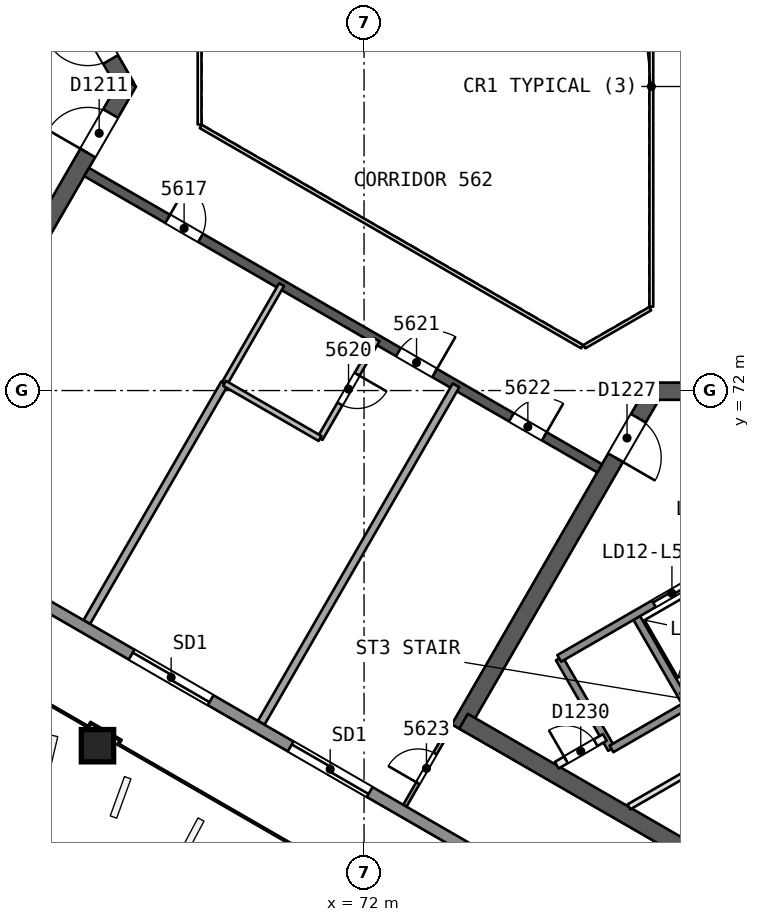
"""IFC4 building model, lengths in metres.
Left out: names, types, materials, properties, quantities, classifications, styles, units other than length and angle.
Written with IfcOpenShell. Run it as: python <this file> out.ifc"""

import sys

from ifc_helpers import new_model, si_unit, direction, frame, frame_2d, origin, origin_2d, place, context, subcontext, project, spatial, rectangle, extrude, element, fill, save


model = new_model("IFC4")
c1 = context("Model", 3, precision=1e-05, world=origin(), true_north=direction((0.0, 1.0)))
c2 = subcontext(c1, "Body", "Model", "MODEL_VIEW")
j1 = project(units=[si_unit("LENGTHUNIT", "METRE"), si_unit("PLANEANGLEUNIT", "RADIAN")], contexts=[c1])
p1 = place(None, origin())
s1 = spatial("IfcSite", under=j1, at=p1, CompositionType="ELEMENT")
p2 = place(p1, origin())
s2 = spatial("IfcBuilding", under=s1, at=p2, CompositionType="ELEMENT")
p3 = place(p2, frame((0.0, 0.0, 228.0)))
s3 = spatial("IfcBuildingStorey", under=s2, at=p3, CompositionType="ELEMENT", Elevation=228.0)
p4 = place(p3, frame((65.74, 80.0, 0.0), z_axis=(0.0, 0.0, 1.0), x_axis=(-0.499991857942, 0.866030104553, 0.0)))
e1 = element("IfcWall", 1, at=p4, inside=s3, PredefinedType="SHEAR", context=c2, shape_type="SweptSolid", body=[
    extrude(rectangle(XDim=10.25, YDim=0.45, at=frame_2d((5.125, 0.0))), origin(), (0.0, 0.0, 1.0), 3.7),
])
p5 = place(p4, frame((0.82, 0.0, 0.0)))
e2 = element("IfcOpeningElement", 2, at=p5, cuts=e1, PredefinedType="OPENING", context=c2, shape_type="SweptSolid", body=[
    extrude(rectangle(XDim=1.2, YDim=2.1, at=frame_2d((0.6, 1.05))), frame((0.0, 0.235, 0.0), z_axis=(0.0, -1.0, 0.0), x_axis=(1.0, 0.0, 0.0)), (0.0, 0.0, 1.0), 0.471),
])
p6 = place(p3, frame((60.728, 71.318, 0.0), z_axis=(0.0, 0.0, 1.0), x_axis=(0.500012416173, 0.866018235185, 0.0)))
e3 = element("IfcWall", 3, at=p6, inside=s3, PredefinedType="SHEAR", context=c2, shape_type="SweptSolid", body=[
    extrude(rectangle(XDim=10.155, YDim=0.45, at=frame_2d((5.078, 0.0))), origin(), (0.0, 0.0, 1.0), 3.7),
])
p7 = place(p6, frame((8.005, 0.0, 0.0)))
e4 = element("IfcOpeningElement", 4, at=p7, cuts=e3, PredefinedType="OPENING", context=c2, shape_type="SweptSolid", body=[
    extrude(rectangle(XDim=1.2, YDim=2.1, at=frame_2d((0.6, 1.05))), frame((0.0, 0.235, 0.0), z_axis=(0.0, -1.0, 0.0), x_axis=(1.0, 0.0, 0.0)), (0.0, 0.0, 1.0), 0.471),
])
p8 = place(p3, frame((79.63, 71.981, 0.0), z_axis=(0.0, 0.0, 1.0), x_axis=(-0.500002171595, -0.86602415001, 0.0)))
e5 = element("IfcWall", 5, at=p8, inside=s3, PredefinedType="SHEAR", context=c2, shape_type="SweptSolid", body=[
    extrude(rectangle(XDim=10.25, YDim=0.45, at=frame_2d((5.125, 0.0))), origin(), (0.0, 0.0, 1.0), 3.7),
])
p9 = place(p8, frame((0.82, 0.0, 0.0)))
e6 = element("IfcOpeningElement", 6, at=p9, cuts=e5, PredefinedType="OPENING", context=c2, shape_type="SweptSolid", body=[
    extrude(rectangle(XDim=1.2, YDim=2.1, at=frame_2d((0.6, 1.05))), frame((0.0, 0.235, 0.0), z_axis=(0.0, -1.0, 0.0), x_axis=(1.0, 0.0, 0.0)), (0.0, 0.0, 1.0), 0.471),
])
p10 = place(p3, frame((74.617, 63.299, 0.0), z_axis=(0.0, 0.0, 1.0), x_axis=(0.86602594008, -0.499999071108, 0.0)))
e7 = element("IfcWall", 7, at=p10, inside=s3, PredefinedType="SHEAR", context=c2, shape_type="SweptSolid", body=[
    extrude(rectangle(XDim=14.108, YDim=0.45, at=frame_2d((7.054, 0.0))), origin(), (0.0, 0.0, 1.0), 3.7),
])
p11 = place(p3, frame((89.655, 71.981, 0.0), z_axis=(0.0, 0.0, 1.0), x_axis=(-1.0, 0.0, 0.0)))
e8 = element("IfcWall", 8, at=p11, inside=s3, PredefinedType="SHEAR", context=c2, shape_type="SweptSolid", body=[
    extrude(rectangle(XDim=10.155, YDim=0.45, at=frame_2d((5.078, 0.0))), origin(), (0.0, 0.0, 1.0), 3.7),
])
p12 = place(p11, frame((8.005, 0.0, 0.0)))
e9 = element("IfcOpeningElement", 9, at=p12, cuts=e8, PredefinedType="OPENING", context=c2, shape_type="SweptSolid", body=[
    extrude(rectangle(XDim=1.2, YDim=2.1, at=frame_2d((0.6, 1.05))), frame((0.0, 0.235, 0.0), z_axis=(0.0, -1.0, 0.0), x_axis=(1.0, 0.0, 0.0)), (0.0, 0.0, 1.0), 0.471),
])
p13 = place(p3, frame((64.7, 77.748, 0.0), z_axis=(0.0, 0.0, 1.0), x_axis=(0.866026492143, -0.499998114903, 0.0)))
e10 = element("IfcWall", 10, at=p13, inside=s3, PredefinedType="SHEAR", context=c2, shape_type="SweptSolid", body=[
    extrude(rectangle(XDim=15.588, YDim=0.25, at=frame_2d((7.794, 0.0))), origin(), (0.0, 0.0, 1.0), 3.3),
])
p14 = place(p13, frame((2.462, 0.0, 0.0)))
e11 = element("IfcOpeningElement", 11, at=p14, cuts=e10, PredefinedType="OPENING", context=c2, shape_type="SweptSolid", body=[
    extrude(rectangle(XDim=1.0, YDim=2.1, at=frame_2d((0.5, 1.05))), frame((0.0, 0.135, 0.0), z_axis=(0.0, -1.0, 0.0), x_axis=(1.0, 0.0, 0.0)), (0.0, 0.0, 1.0), 0.271),
])
p15 = place(p13, frame((9.474, 0.0, 0.0)))
e12 = element("IfcOpeningElement", 12, at=p15, cuts=e10, PredefinedType="OPENING", context=c2, shape_type="SweptSolid", body=[
    extrude(rectangle(XDim=1.1, YDim=2.1, at=frame_2d((0.55, 1.05))), frame((0.0, 0.135, 0.0), z_axis=(0.0, -1.0, 0.0), x_axis=(1.0, 0.0, 0.0)), (0.0, 0.0, 1.0), 0.271),
])
p16 = place(p13, frame((12.906, 0.0, 0.0)))
e13 = element("IfcOpeningElement", 13, at=p16, cuts=e10, PredefinedType="OPENING", context=c2, shape_type="SweptSolid", body=[
    extrude(rectangle(XDim=1.0, YDim=2.1, at=frame_2d((0.5, 1.05))), frame((0.0, 0.135, 0.0), z_axis=(0.0, -1.0, 0.0), x_axis=(1.0, 0.0, 0.0)), (0.0, 0.0, 1.0), 0.271),
])
p17 = place(p3, frame((64.974, 62.634, 0.0), z_axis=(0.010093620709, 0.017482414954, 0.999796221231), x_axis=(-0.866029335546, 0.499993189927, 2.83273e-07)))
e14 = element("IfcColumn", 14, at=p17, inside=s3, PredefinedType="COLUMN", context=c2, shape_type="SweptSolid", body=[
    extrude(rectangle(XDim=0.85, YDim=0.85, at=origin_2d()), origin(), (0.0, 0.0, 1.0), 3.701),
])
p18 = place(p3, frame((64.703, 65.907, 0.0), z_axis=(0.0, 0.0, 1.0), x_axis=(0.500019628412, 0.866014071019, 0.0)))
e15 = element("IfcWall", 15, at=p18, inside=s3, PredefinedType="PARTITIONING", context=c2, shape_type="SweptSolid", body=[
    extrude(rectangle(XDim=7.254, YDim=0.2, at=frame_2d((3.627, 0.0))), origin(), (0.0, 0.0, 1.0), 3.3),
])
p19 = place(p3, frame((68.33, 72.188, 0.0), z_axis=(0.0, 0.0, 1.0), x_axis=(0.499990139034, 0.866031096941, 0.0)))
e16 = element("IfcWall", 16, at=p19, inside=s3, PredefinedType="PARTITIONING", context=c2, shape_type="SweptSolid", body=[
    extrude(rectangle(XDim=3.0, YDim=0.15, at=frame_2d((1.5, 0.0))), origin(), (0.0, 0.0, 1.0), 3.3),
])
p20 = place(p3, frame((72.342, 73.336, 0.0), z_axis=(0.0, 0.0, 1.0), x_axis=(-0.50002537861, -0.866010750942, 0.0)))
e17 = element("IfcWall", 17, at=p20, inside=s3, PredefinedType="PARTITIONING", context=c2, shape_type="SweptSolid", body=[
    extrude(rectangle(XDim=3.0, YDim=0.15, at=frame_2d((1.5, 0.0))), origin(), (0.0, 0.0, 1.0), 3.3),
])
p21 = place(p20, frame((1.05, 0.0, 0.0)))
e18 = element("IfcOpeningElement", 18, at=p21, cuts=e17, PredefinedType="OPENING", context=c2, shape_type="SweptSolid", body=[
    extrude(rectangle(XDim=0.9, YDim=2.1, at=frame_2d((0.45, 1.05))), frame((0.0, 0.085, 0.0), z_axis=(0.0, -1.0, 0.0), x_axis=(1.0, 0.0, 0.0)), (0.0, 0.0, 1.0), 0.171),
])
p22 = place(p3, frame((70.842, 70.739, 0.0), z_axis=(0.0, 0.0, 1.0), x_axis=(-0.866032775405, 0.499987231761, 0.0)))
e19 = element("IfcWall", 19, at=p22, inside=s3, PredefinedType="PARTITIONING", context=c2, shape_type="SweptSolid", body=[
    extrude(rectangle(XDim=2.9, YDim=0.15, at=frame_2d((1.45, 0.0))), origin(), (0.0, 0.0, 1.0), 3.3),
])
p23 = place(p3, frame((69.293, 63.257, 0.0), z_axis=(0.0, 0.0, 1.0), x_axis=(0.49999314277, 0.866029362772, 0.0)))
e20 = element("IfcWall", 20, at=p23, inside=s3, PredefinedType="PARTITIONING", context=c2, shape_type="SweptSolid", body=[
    extrude(rectangle(XDim=10.254, YDim=0.2, at=frame_2d((5.127, 0.0))), origin(), (0.0, 0.0, 1.0), 3.3),
])
p24 = place(p3, frame((73.073, 61.074, 0.0), z_axis=(0.0, 0.0, 1.0), x_axis=(0.499948534732, 0.866055115232, 0.0)))
e21 = element("IfcWall", 21, at=p24, inside=s3, PredefinedType="PARTITIONING", context=c2, shape_type="SweptSolid", body=[
    extrude(rectangle(XDim=2.275, YDim=0.1, at=frame_2d((1.137, 0.0))), origin(), (0.0, 0.0, 1.0), 3.3),
])
p25 = place(p24, frame((0.687, 0.0, 0.0)))
e22 = element("IfcOpeningElement", 22, at=p25, cuts=e21, PredefinedType="OPENING", context=c2, shape_type="SweptSolid", body=[
    extrude(rectangle(XDim=0.9, YDim=2.1, at=frame_2d((0.45, 1.05))), frame((0.0, 0.061, 0.0), z_axis=(0.0, -1.0, 0.0), x_axis=(1.0, 0.0, 0.0)), (0.0, 0.0, 1.0), 0.121),
])
p26 = place(p3, frame((88.043, 52.259, 0.0), z_axis=(0.0, 0.0, 1.0), x_axis=(-0.86602387423, 0.500002649256, 0.0)))
e23 = element("IfcWall", 23, at=p26, inside=s3, PredefinedType="SOLIDWALL", context=c2, shape_type="SweptSolid", body=[
    extrude(rectangle(XDim=50.333, YDim=0.3, at=frame_2d((25.167, 0.0))), origin(), (0.0, 0.0, 1.0), 3.3),
])
p27 = place(p26, frame((23.187, 0.0, 0.0)))
e24 = element("IfcOpeningElement", 24, at=p27, cuts=e23, PredefinedType="OPENING", context=c2, shape_type="SweptSolid", body=[
    extrude(rectangle(XDim=2.4, YDim=2.4, at=frame_2d((1.2, 1.2))), frame((0.0, 0.161, 0.0), z_axis=(0.0, -1.0, 0.0), x_axis=(1.0, 0.0, 0.0)), (0.0, 0.0, 1.0), 0.321),
])
p28 = place(p26, frame((28.799, 0.0, 0.0)))
e25 = element("IfcOpeningElement", 25, at=p28, cuts=e23, PredefinedType="OPENING", context=c2, shape_type="SweptSolid", body=[
    extrude(rectangle(XDim=2.4, YDim=2.4, at=frame_2d((1.2, 1.2))), frame((0.0, 0.161, 0.0), z_axis=(0.0, -1.0, 0.0), x_axis=(1.0, 0.0, 0.0)), (0.0, 0.0, 1.0), 0.321),
])
p29 = place(p26, frame((39.164, 0.0, 0.0)))
e26 = element("IfcOpeningElement", 26, at=p29, cuts=e23, PredefinedType="OPENING", context=c2, shape_type="SweptSolid", body=[
    extrude(rectangle(XDim=2.4, YDim=2.4, at=frame_2d((1.2, 1.2))), frame((0.0, 0.161, 0.0), z_axis=(0.0, -1.0, 0.0), x_axis=(1.0, 0.0, 0.0)), (0.0, 0.0, 1.0), 0.321),
])
p30 = place(p26, frame((18.354, 0.0, 0.0)))
e27 = element("IfcOpeningElement", 27, at=p30, cuts=e23, PredefinedType="OPENING", context=c2, shape_type="SweptSolid", body=[
    extrude(rectangle(XDim=2.4, YDim=2.4, at=frame_2d((1.2, 1.2))), frame((0.0, 0.161, 0.0), z_axis=(0.0, -1.0, 0.0), x_axis=(1.0, 0.0, 0.0)), (0.0, 0.0, 1.0), 0.321),
])
p31 = place(p26, frame((8.763, 0.0, 0.0)))
e28 = element("IfcOpeningElement", 28, at=p31, cuts=e23, PredefinedType="OPENING", context=c2, shape_type="SweptSolid", body=[
    extrude(rectangle(XDim=2.4, YDim=2.4, at=frame_2d((1.2, 1.2))), frame((0.0, 0.161, 0.0), z_axis=(0.0, -1.0, 0.0), x_axis=(1.0, 0.0, 0.0)), (0.0, 0.0, 1.0), 0.321),
])
for number, where, z_axis, x_axis in (
    (29, (77.135, 64.952, 0.0), (0.0, 0.0, 1.0), (0.5, -0.866, 0.0)),
    (30, (79.127, 66.102, 0.0), (0.0, 0.0, 1.0), (0.5, -0.866, 0.0)),
):
    element("IfcWall", number, at=place(p3, frame(where, z_axis=z_axis, x_axis=x_axis)), inside=s3, PredefinedType="SOLIDWALL", context=c2, shape_type="SweptSolid", body=[
        extrude(rectangle(XDim=2.75, YDim=0.2, at=frame_2d((1.375, 0.0))), origin(), (0.0, 0.0, 1.0), 3.3),
    ])
p32 = place(p3, frame((77.135, 64.952, 0.0), z_axis=(0.0, 0.0, 1.0), x_axis=(0.866031916153, 0.499988720078, 0.0)))
e31 = element("IfcWall", 31, at=p32, inside=s3, PredefinedType="SOLIDWALL", context=c2, shape_type="SweptSolid", body=[
    extrude(rectangle(XDim=11.35, YDim=0.2, at=frame_2d((5.675, 0.0))), origin(), (0.0, 0.0, 1.0), 3.3),
])
p33 = place(p32, frame((2.875, 0.0, 0.0)))
e32 = element("IfcOpeningElement", 32, at=p33, cuts=e31, PredefinedType="OPENING", context=c2, shape_type="SweptSolid", body=[
    extrude(rectangle(XDim=1.1, YDim=2.1, at=frame_2d((0.55, 1.05))), frame((0.0, 0.11, 0.0), z_axis=(0.0, -1.0, 0.0), x_axis=(1.0, 0.0, 0.0)), (0.0, 0.0, 1.0), 0.221),
])
p34 = place(p32, frame((5.125, 0.0, 0.0)))
e33 = element("IfcOpeningElement", 33, at=p34, cuts=e31, PredefinedType="OPENING", context=c2, shape_type="SweptSolid", body=[
    extrude(rectangle(XDim=1.1, YDim=2.1, at=frame_2d((0.55, 1.05))), frame((0.0, 0.11, 0.0), z_axis=(0.0, -1.0, 0.0), x_axis=(1.0, 0.0, 0.0)), (0.0, 0.0, 1.0), 0.221),
])
p35 = place(p32, frame((7.375, 0.0, 0.0)))
e34 = element("IfcOpeningElement", 34, at=p35, cuts=e31, PredefinedType="OPENING", context=c2, shape_type="SweptSolid", body=[
    extrude(rectangle(XDim=1.1, YDim=2.1, at=frame_2d((0.55, 1.05))), frame((0.0, 0.11, 0.0), z_axis=(0.0, -1.0, 0.0), x_axis=(1.0, 0.0, 0.0)), (0.0, 0.0, 1.0), 0.221),
])
p36 = place(p3, frame((77.07, 62.143, 0.0), z_axis=(0.0, 0.0, 1.0), x_axis=(0.866013036001, 0.500021421018, 0.0)))
e35 = element("IfcWall", 35, at=p36, inside=s3, PredefinedType="PARTITIONING", context=c2, shape_type="SweptSolid", body=[
    extrude(rectangle(XDim=1.461, YDim=0.2, at=frame_2d((0.73, 0.0))), origin(), (0.0, 0.0, 1.0), 3.3),
])
p37 = place(p36, frame((0.281, 0.0, 0.0)))
e36 = element("IfcOpeningElement", 36, at=p37, cuts=e35, PredefinedType="OPENING", context=c2, shape_type="SweptSolid", body=[
    extrude(rectangle(XDim=0.9, YDim=2.1, at=frame_2d((0.45, 1.05))), frame((0.0, 0.11, 0.0), z_axis=(0.0, -1.0, 0.0), x_axis=(1.0, 0.0, 0.0)), (0.0, 0.0, 1.0), 0.221),
])
p38 = place(p3, frame((80.367, 63.954, 0.0), z_axis=(0.0, 0.0, 1.0), x_axis=(0.866026575979, 0.499997969693, 0.0)))
e37 = element("IfcWall", 37, at=p38, inside=s3, PredefinedType="SOLIDWALL", context=c2, shape_type="SweptSolid", body=[
    extrude(rectangle(XDim=6.75, YDim=0.2, at=frame_2d((3.375, 0.0))), origin(), (0.0, 0.0, 1.0), 3.3),
])
p39 = place(p3, frame((78.51, 62.57, 0.0), z_axis=(0.0, 0.0, 1.0), x_axis=(0.866053019151, 0.499952165731, 0.0)))
e38 = element("IfcWall", 38, at=p39, inside=s3, PredefinedType="SOLIDWALL", context=c2, shape_type="SweptSolid", body=[
    extrude(rectangle(XDim=2.3, YDim=0.2, at=frame_2d((1.15, 0.0))), origin(), (0.0, 0.0, 1.0), 3.3),
])
p40 = place(p3, frame((78.97, 61.046, 0.0), z_axis=(0.0, 0.0, 1.0), x_axis=(0.866033475577, 0.499986018985, 0.0)))
e39 = element("IfcWall", 39, at=p40, inside=s3, PredefinedType="PARTITIONING", context=c2, shape_type="SweptSolid", body=[
    extrude(rectangle(XDim=2.539, YDim=0.15, at=frame_2d((1.27, 0.0))), origin(), (0.0, 0.0, 1.0), 3.3),
])
p41 = place(p3, frame((79.56, 74.206, 0.0), z_axis=(0.0, 0.0, 1.0), x_axis=(0.0, 1.0, 0.0)))
e40 = element("IfcWall", 40, at=p41, inside=s3, PredefinedType="PARTITIONING", context=c2, shape_type="SweptSolid", body=[
    extrude(rectangle(XDim=11.588, YDim=0.1, at=frame_2d((5.794, 0.0))), origin(), (0.0, 0.0, 1.0), 3.3),
])
p42 = place(p3, frame((67.672, 81.0, 0.0), z_axis=(0.0, 0.0, 1.0), x_axis=(0.0, -1.0, 0.0)))
e41 = element("IfcWall", 41, at=p42, inside=s3, PredefinedType="PARTITIONING", context=c2, shape_type="SweptSolid", body=[
    extrude(rectangle(XDim=2.0, YDim=0.1, at=frame_2d((1.0, 0.0))), origin(), (0.0, 0.0, 1.0), 3.3),
])
p43 = place(p3, frame((67.702, 78.948, 0.0), z_axis=(0.0, 0.0, 1.0), x_axis=(0.866026658274, -0.499997827154, 0.0)))
e42 = element("IfcWall", 42, at=p43, inside=s3, PredefinedType="PARTITIONING", context=c2, shape_type="SweptSolid", body=[
    extrude(rectangle(XDim=11.588, YDim=0.1, at=frame_2d((5.794, 0.0))), origin(), (0.0, 0.0, 1.0), 3.3),
])
p44 = place(p3, frame((77.798, 73.154, 0.0), z_axis=(0.0, 0.0, 1.0), x_axis=(0.866041268327, 0.499972520799, 0.0)))
e43 = element("IfcWall", 43, at=p44, inside=s3, PredefinedType="PARTITIONING", context=c2, shape_type="SweptSolid", body=[
    extrude(rectangle(XDim=2.0, YDim=0.1, at=frame_2d((1.0, 0.0))), origin(), (0.0, 0.0, 1.0), 3.3),
])
p45 = place(p14, origin())
e44 = element("IfcDoor", 44, at=p45, inside=s3, OperationType="SINGLE_SWING_LEFT", PredefinedType="NOTDEFINED", context=c2, shape_type="SweptSolid", body=[
    extrude(rectangle(XDim=1.0, YDim=2.1, at=frame_2d((0.5, 1.05))), frame((0.0, 0.025, 0.0), z_axis=(0.0, -1.0, 0.0), x_axis=(1.0, 0.0, 0.0)), (0.0, 0.0, 1.0), 0.05),
])
fill(e11, e44)
p46 = place(p21, origin())
e45 = element("IfcDoor", 45, at=p46, inside=s3, OperationType="SINGLE_SWING_LEFT", PredefinedType="NOTDEFINED", context=c2, shape_type="SweptSolid", body=[
    extrude(rectangle(XDim=0.9, YDim=2.1, at=frame_2d((0.45, 1.05))), frame((0.0, 0.025, 0.0), z_axis=(0.0, -1.0, 0.0), x_axis=(1.0, 0.0, 0.0)), (0.0, 0.0, 1.0), 0.05),
])
fill(e18, e45)
p47 = place(p15, origin())
e46 = element("IfcDoor", 46, at=p47, inside=s3, OperationType="SINGLE_SWING_RIGHT", PredefinedType="NOTDEFINED", context=c2, shape_type="SweptSolid", body=[
    extrude(rectangle(XDim=1.1, YDim=2.1, at=frame_2d((0.55, 1.05))), frame((0.0, 0.025, 0.0), z_axis=(0.0, -1.0, 0.0), x_axis=(1.0, 0.0, 0.0)), (0.0, 0.0, 1.0), 0.05),
])
fill(e12, e46)
p48 = place(p16, origin())
e47 = element("IfcDoor", 47, at=p48, inside=s3, OperationType="SINGLE_SWING_RIGHT", PredefinedType="NOTDEFINED", context=c2, shape_type="SweptSolid", body=[
    extrude(rectangle(XDim=1.0, YDim=2.1, at=frame_2d((0.5, 1.05))), frame((0.0, 0.025, 0.0), z_axis=(0.0, -1.0, 0.0), x_axis=(1.0, 0.0, 0.0)), (0.0, 0.0, 1.0), 0.05),
])
fill(e13, e47)
p49 = place(p25, origin())
e48 = element("IfcDoor", 48, at=p49, inside=s3, OperationType="SINGLE_SWING_LEFT", PredefinedType="NOTDEFINED", context=c2, shape_type="SweptSolid", body=[
    extrude(rectangle(XDim=0.9, YDim=2.1, at=frame_2d((0.45, 1.05))), frame((0.0, 0.025, 0.0), z_axis=(0.0, -1.0, 0.0), x_axis=(1.0, 0.0, 0.0)), (0.0, 0.0, 1.0), 0.05),
])
fill(e22, e48)
p50 = place(p27, origin())
e49 = element("IfcDoor", 49, at=p50, inside=s3, OperationType="SLIDING_TO_LEFT", PredefinedType="NOTDEFINED", context=c2, shape_type="SweptSolid", body=[
    extrude(rectangle(XDim=2.4, YDim=2.4, at=frame_2d((1.2, 1.2))), frame((0.0, 0.025, 0.0), z_axis=(0.0, -1.0, 0.0), x_axis=(1.0, 0.0, 0.0)), (0.0, 0.0, 1.0), 0.05),
])
fill(e24, e49)
p51 = place(p30, origin())
e50 = element("IfcDoor", 50, at=p51, inside=s3, OperationType="SLIDING_TO_RIGHT", PredefinedType="NOTDEFINED", context=c2, shape_type="SweptSolid", body=[
    extrude(rectangle(XDim=2.4, YDim=2.4, at=frame_2d((1.2, 1.2))), frame((0.0, 0.025, 0.0), z_axis=(0.0, -1.0, 0.0), x_axis=(1.0, 0.0, 0.0)), (0.0, 0.0, 1.0), 0.05),
])
fill(e27, e50)
p52 = place(p5, origin())
e51 = element("IfcDoor", 51, at=p52, inside=s3, OperationType="SINGLE_SWING_RIGHT", PredefinedType="NOTDEFINED", context=c2, shape_type="SweptSolid", body=[
    extrude(rectangle(XDim=1.2, YDim=2.1, at=frame_2d((0.6, 1.05))), frame((0.0, 0.025, 0.0), z_axis=(0.0, -1.0, 0.0), x_axis=(1.0, 0.0, 0.0)), (0.0, 0.0, 1.0), 0.05),
])
fill(e2, e51)
p53 = place(p7, origin())
e52 = element("IfcDoor", 52, at=p53, inside=s3, OperationType="SINGLE_SWING_LEFT", PredefinedType="NOTDEFINED", context=c2, shape_type="SweptSolid", body=[
    extrude(rectangle(XDim=1.2, YDim=2.1, at=frame_2d((0.6, 1.05))), frame((0.0, 0.025, 0.0), z_axis=(0.0, -1.0, 0.0), x_axis=(1.0, 0.0, 0.0)), (0.0, 0.0, 1.0), 0.05),
])
fill(e4, e52)
p54 = place(p9, origin())
e53 = element("IfcDoor", 53, at=p54, inside=s3, OperationType="SINGLE_SWING_RIGHT", PredefinedType="NOTDEFINED", context=c2, shape_type="SweptSolid", body=[
    extrude(rectangle(XDim=1.2, YDim=2.1, at=frame_2d((0.6, 1.05))), frame((0.0, 0.025, 0.0), z_axis=(0.0, -1.0, 0.0), x_axis=(1.0, 0.0, 0.0)), (0.0, 0.0, 1.0), 0.05),
])
fill(e6, e53)
p55 = place(p33, origin())
e54 = element("IfcDoor", 54, at=p55, inside=s3, OperationType="SLIDING_TO_LEFT", PredefinedType="NOTDEFINED", context=c2, shape_type="SweptSolid", body=[
    extrude(rectangle(XDim=1.1, YDim=2.1, at=frame_2d((0.55, 1.05))), frame((0.0, 0.025, 0.0), z_axis=(0.0, -1.0, 0.0), x_axis=(1.0, 0.0, 0.0)), (0.0, 0.0, 1.0), 0.05),
])
fill(e32, e54)
p56 = place(p37, origin())
e55 = element("IfcDoor", 55, at=p56, inside=s3, OperationType="SINGLE_SWING_LEFT", PredefinedType="NOTDEFINED", context=c2, shape_type="SweptSolid", body=[
    extrude(rectangle(XDim=0.9, YDim=2.1, at=frame_2d((0.45, 1.05))), frame((0.0, 0.025, 0.0), z_axis=(0.0, -1.0, 0.0), x_axis=(1.0, 0.0, 0.0)), (0.0, 0.0, 1.0), 0.05),
])
fill(e36, e55)
save(model, sys.argv[1])
